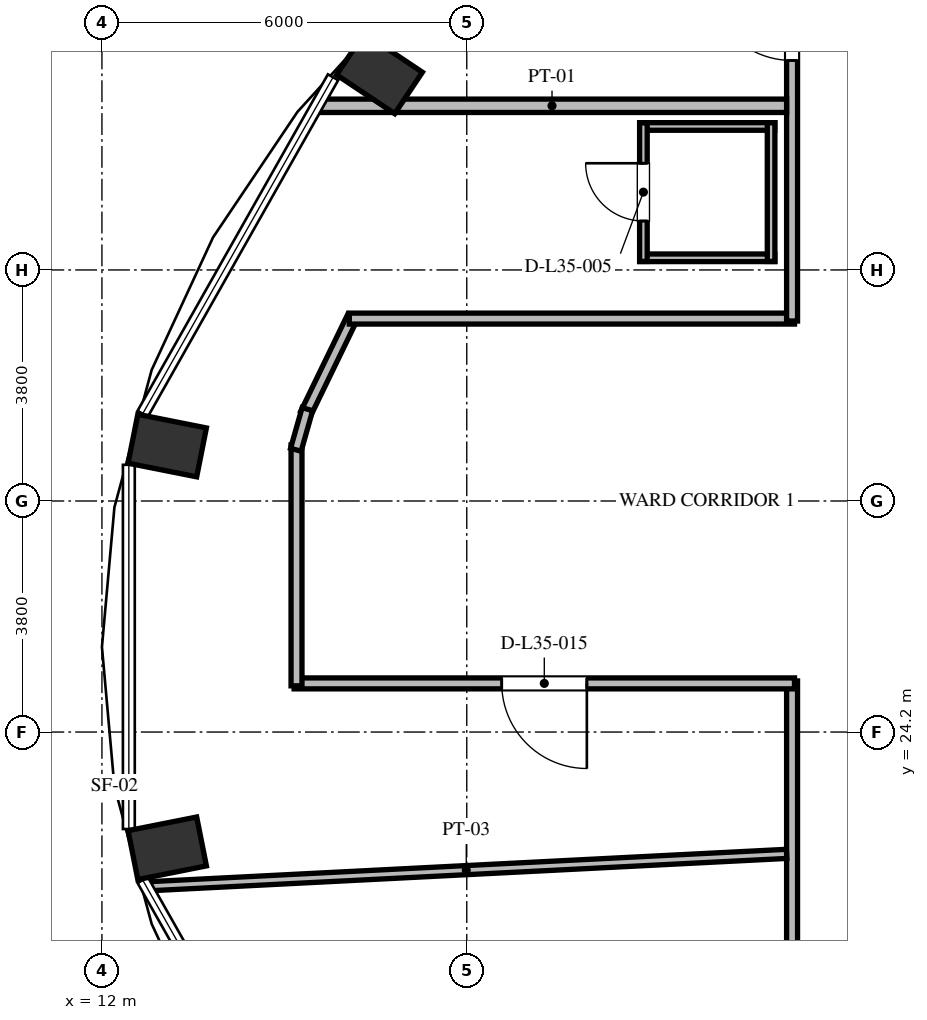
"""IFC4 building model, lengths in metres.
Left out: names, types, materials, properties, quantities, classifications, styles, units other than length and angle.
Written with IfcOpenShell. Run it as: python <this file> out.ifc"""

import sys

from ifc_helpers import new_model, si_unit, direction, frame, frame_2d, origin, origin_2d, place, context, subcontext, project, spatial, rectangle, extrude, element, fill, save


model = new_model("IFC4")
c1 = context("Model", 3, precision=1e-05, world=origin(), true_north=direction((0.0, 1.0)))
c2 = subcontext(c1, "Body", "Model", "MODEL_VIEW")
j1 = project(units=[si_unit("LENGTHUNIT", "METRE"), si_unit("PLANEANGLEUNIT", "RADIAN")], contexts=[c1])
p1 = place(None, origin())
s1 = spatial("IfcSite", under=j1, at=p1, CompositionType="ELEMENT")
p2 = place(p1, origin())
s2 = spatial("IfcBuilding", under=s1, at=p2, CompositionType="ELEMENT")
p3 = place(p2, frame((0.0, 0.0, 138.288)))
s3 = spatial("IfcBuildingStorey", under=s2, at=p3, CompositionType="ELEMENT", Elevation=138.288)
for number, where, z_axis, x_axis in (
    (1, (16.564, 35.031, 0.0), (0.0, 0.0, 1.0), (-0.831, 0.556, 0.0)),
    (2, (13.074, 28.912, 0.0), (0.0, 0.0, 1.0), (-0.981, 0.195, 0.0)),
    (3, (13.074, 22.288, 0.0), (0.0, 0.0, 1.0), (-0.981, -0.195, 0.0)),
):
    element("IfcColumn", number, at=place(p3, frame(where, z_axis=z_axis, x_axis=x_axis)), inside=s3, PredefinedType="COLUMN", context=c2, shape_type="SweptSolid", body=[
        extrude(rectangle(XDim=1.15, YDim=0.82, at=origin_2d()), origin(), (0.0, 0.0, 1.0), 3.648),
    ])
p4 = place(p3, frame((15.35, 29.436, 0.0), z_axis=(0.0, 0.0, 1.0), x_axis=(0.436196025907, 0.899851669434, 0.0)))
e4 = element("IfcWall", 4, at=p4, inside=s3, PredefinedType="PARTITIONING", context=c2, shape_type="SweptSolid", body=[
    extrude(rectangle(XDim=1.778, YDim=0.18, at=frame_2d((0.889, 0.0))), origin(), (0.0, 0.0, 1.0), 3.428),
])
p5 = place(p3, frame((16.068, 31.0, 0.0), z_axis=(0.0, 0.0, 1.0), x_axis=(1.0, 0.0, 0.0)))
e5 = element("IfcWall", 5, at=p5, inside=s3, PredefinedType="PARTITIONING", context=c2, shape_type="SweptSolid", body=[
    extrude(rectangle(XDim=7.322, YDim=0.18, at=frame_2d((3.661, 0.0))), origin(), (0.0, 0.0, 1.0), 3.428),
])
p6 = place(p3, frame((23.35, 30.96, 0.0), z_axis=(0.0, 0.0, 1.0), x_axis=(0.0, 1.0, 0.0)))
e6 = element("IfcWall", 6, at=p6, inside=s3, PredefinedType="PARTITIONING", context=c2, shape_type="SweptSolid", body=[
    extrude(rectangle(XDim=6.714, YDim=0.18, at=frame_2d((3.357, 0.0))), origin(), (0.0, 0.0, 1.0), 3.428),
])
p7 = place(p6, frame((4.285, 0.0, 0.0)))
e7 = element("IfcOpeningElement", 7, at=p7, cuts=e6, PredefinedType="OPENING", context=c2, shape_type="SweptSolid", body=[
    extrude(rectangle(XDim=1.4, YDim=2.2, at=frame_2d((0.7, 1.1))), frame((0.0, 0.1, 0.0), z_axis=(0.0, -1.0, 0.0), x_axis=(1.0, 0.0, 0.0)), (0.0, 0.0, 1.0), 0.2),
])
p8 = place(p3, frame((23.35, 19.98, 0.0), z_axis=(0.0, 0.0, 1.0), x_axis=(0.0, 1.0, 0.0)))
e8 = element("IfcWall", 8, at=p8, inside=s3, PredefinedType="PARTITIONING", context=c2, shape_type="SweptSolid", body=[
    extrude(rectangle(XDim=5.06, YDim=0.18, at=frame_2d((2.53, 0.0))), origin(), (0.0, 0.0, 1.0), 3.428),
])
p9 = place(p3, frame((23.39, 25.0, 0.0), z_axis=(0.0, 0.0, 1.0), x_axis=(-1.0, 0.0, 0.0)))
e9 = element("IfcWall", 9, at=p9, inside=s3, PredefinedType="PARTITIONING", context=c2, shape_type="SweptSolid", body=[
    extrude(rectangle(XDim=8.23, YDim=0.18, at=frame_2d((4.115, 0.0))), origin(), (0.0, 0.0, 1.0), 3.428),
])
p10 = place(p9, frame((3.415, 0.0, 0.0)))
e10 = element("IfcOpeningElement", 10, at=p10, cuts=e9, PredefinedType="OPENING", context=c2, shape_type="SweptSolid", body=[
    extrude(rectangle(XDim=1.4, YDim=2.2, at=frame_2d((0.7, 1.1))), frame((0.0, 0.1, 0.0), z_axis=(0.0, -1.0, 0.0), x_axis=(1.0, 0.0, 0.0)), (0.0, 0.0, 1.0), 0.2),
])
p11 = place(p3, frame((15.2, 24.96, 0.0), z_axis=(0.0, 0.0, 1.0), x_axis=(0.0, 1.0, 0.0)))
e11 = element("IfcWall", 11, at=p11, inside=s3, PredefinedType="PARTITIONING", context=c2, shape_type="SweptSolid", body=[
    extrude(rectangle(XDim=3.961, YDim=0.18, at=frame_2d((1.98, 0.0))), origin(), (0.0, 0.0, 1.0), 3.428),
])
p12 = place(p3, frame((15.189, 28.843, 0.0), z_axis=(0.0, 0.0, 1.0), x_axis=(0.272862960331, 0.962052911684, 0.0)))
e12 = element("IfcWall", 12, at=p12, inside=s3, PredefinedType="PARTITIONING", context=c2, shape_type="SweptSolid", body=[
    extrude(rectangle(XDim=0.694, YDim=0.18, at=frame_2d((0.347, 0.0))), origin(), (0.0, 0.0, 1.0), 3.428),
])
p13 = place(p3, frame((12.723, 21.661, 0.0), z_axis=(0.0, 0.0, 1.0), x_axis=(0.998712791022, 0.050722391981, 0.0)))
e13 = element("IfcWall", 13, at=p13, inside=s3, PredefinedType="PARTITIONING", context=c2, shape_type="SweptSolid", body=[
    extrude(rectangle(XDim=10.551, YDim=0.15, at=frame_2d((5.275, 0.0))), origin(), (0.0, 0.0, 1.0), 2.863),
])
p14 = place(p3, frame((15.544, 34.5, 0.0), z_axis=(0.0, 0.0, 1.0), x_axis=(1.0, 0.0, 0.0)))
e14 = element("IfcWall", 14, at=p14, inside=s3, PredefinedType="PARTITIONING", context=c2, shape_type="SweptSolid", body=[
    extrude(rectangle(XDim=7.716, YDim=0.22, at=frame_2d((3.858, 0.0))), origin(), (0.0, 0.0, 1.0), 3.428),
])
for number, where, z_axis, x_axis in (
    (15, (20.845, 34.16, 0.0), (0.0, 0.0, 1.0), (1.0, 0.0, 0.0)),
    (16, (20.845, 32.0, 0.0), (0.0, 0.0, 1.0), (1.0, 0.0, 0.0)),
):
    element("IfcWall", number, at=place(p3, frame(where, z_axis=z_axis, x_axis=x_axis)), inside=s3, PredefinedType="PARTITIONING", context=c2, shape_type="SweptSolid", body=[
        extrude(rectangle(XDim=2.22, YDim=0.125, at=frame_2d((1.11, 0.0))), origin(), (0.0, 0.0, 1.0), 3.428),
    ])
p15 = place(p3, frame((23.005, 31.94, 0.0), z_axis=(0.0, 0.0, 1.0), x_axis=(0.0, 1.0, 0.0)))
e17 = element("IfcWall", 17, at=p15, inside=s3, PredefinedType="PARTITIONING", context=c2, shape_type="SweptSolid", body=[
    extrude(rectangle(XDim=2.28, YDim=0.125, at=frame_2d((1.14, 0.0))), origin(), (0.0, 0.0, 1.0), 3.428),
])
p16 = place(p3, frame((20.905, 31.94, 0.0), z_axis=(0.0, 0.0, 1.0), x_axis=(0.0, 1.0, 0.0)))
e18 = element("IfcWall", 18, at=p16, inside=s3, PredefinedType="PARTITIONING", context=c2, shape_type="SweptSolid", body=[
    extrude(rectangle(XDim=2.28, YDim=0.125, at=frame_2d((1.14, 0.0))), origin(), (0.0, 0.0, 1.0), 3.053),
])
p17 = place(p16, frame((0.665, 0.0, 0.0)))
e19 = element("IfcOpeningElement", 19, at=p17, cuts=e18, PredefinedType="OPENING", context=c2, shape_type="SweptSolid", body=[
    extrude(rectangle(XDim=0.95, YDim=2.1, at=frame_2d((0.475, 1.05))), frame((0.0, 0.073, 0.0), z_axis=(0.0, -1.0, 0.0), x_axis=(1.0, 0.0, 0.0)), (0.0, 0.0, 1.0), 0.145),
])
p18 = place(p17, origin())
e20 = element("IfcDoor", 20, at=p18, inside=s3, OperationType="SINGLE_SWING_RIGHT", PredefinedType="DOOR", context=c2, shape_type="SweptSolid", body=[
    extrude(rectangle(XDim=0.95, YDim=2.1, at=frame_2d((0.475, 1.05))), frame((0.0, 0.025, 0.0), z_axis=(0.0, -1.0, 0.0), x_axis=(1.0, 0.0, 0.0)), (0.0, 0.0, 1.0), 0.05),
])
fill(e19, e20)
p19 = place(p10, origin())
e21 = element("IfcDoor", 21, at=p19, inside=s3, OperationType="SINGLE_SWING_LEFT", PredefinedType="DOOR", context=c2, shape_type="SweptSolid", body=[
    extrude(rectangle(XDim=1.4, YDim=2.2, at=frame_2d((0.7, 1.1))), frame((0.0, 0.025, 0.0), z_axis=(0.0, -1.0, 0.0), x_axis=(1.0, 0.0, 0.0)), (0.0, 0.0, 1.0), 0.05),
])
fill(e10, e21)
p20 = place(p7, origin())
e22 = element("IfcDoor", 22, at=p20, inside=s3, OperationType="SINGLE_SWING_RIGHT", PredefinedType="DOOR", context=c2, shape_type="SweptSolid", body=[
    extrude(rectangle(XDim=1.4, YDim=2.2, at=frame_2d((0.7, 1.1))), frame((0.0, 0.025, 0.0), z_axis=(0.0, -1.0, 0.0), x_axis=(1.0, 0.0, 0.0)), (0.0, 0.0, 1.0), 0.05),
])
fill(e7, e22)
save(model, sys.argv[1])
